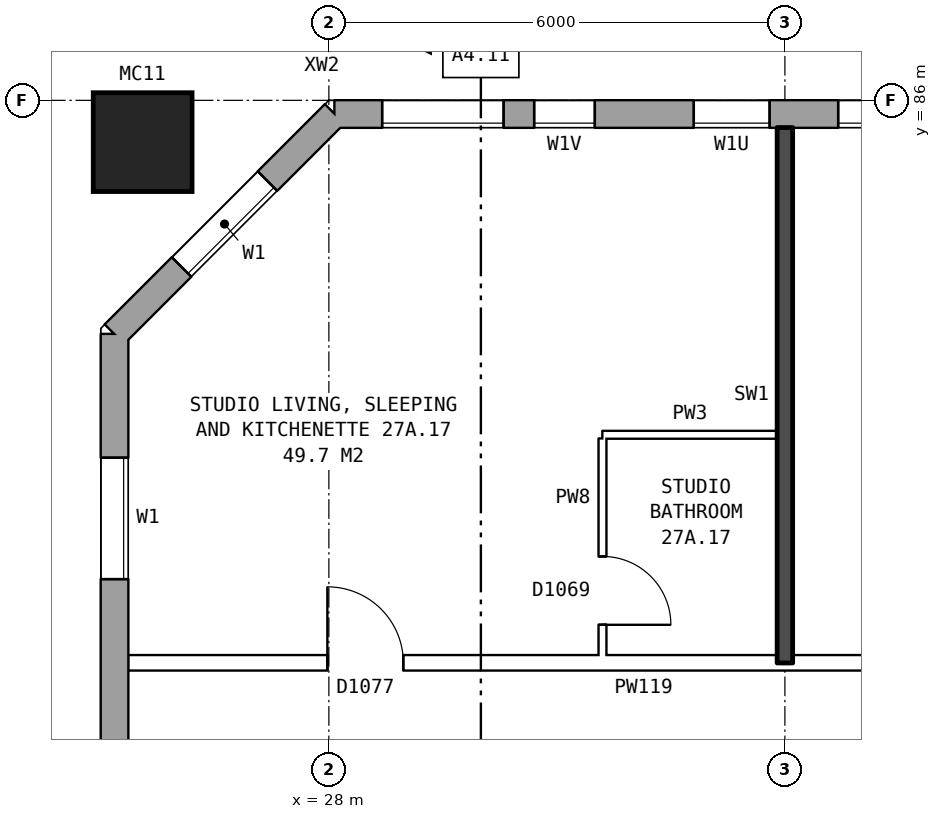
"""IFC4 building model, lengths in metres.
Left out: names, types, materials, properties, quantities, classifications, styles, units other than length and angle.
Written with IfcOpenShell. Run it as: python <this file> out.ifc"""

import sys

from ifc_helpers import new_model, si_unit, direction, frame, frame_2d, origin, origin_2d, place, context, subcontext, project, spatial, rectangle, hollow_rectangle, extrude, element, fill, save


model = new_model("IFC4")
c1 = context("Model", 3, precision=1e-05, world=origin(), true_north=direction((0.0, 1.0)))
c2 = subcontext(c1, "Body", "Model", "MODEL_VIEW")
j1 = project(units=[si_unit("LENGTHUNIT", "METRE"), si_unit("PLANEANGLEUNIT", "RADIAN")], contexts=[c1])
p1 = place(None, origin())
s1 = spatial("IfcSite", under=j1, at=p1, CompositionType="ELEMENT")
p2 = place(p1, origin())
s2 = spatial("IfcBuilding", under=s1, at=p2, CompositionType="ELEMENT")
p3 = place(p2, frame((0.0, 0.0, 99.5)))
s3 = spatial("IfcBuildingStorey", under=s2, at=p3, CompositionType="ELEMENT", Elevation=99.5)
p4 = place(p3, frame((25.55, 85.45, 0.0), z_axis=(0.0, 0.0, 1.0), x_axis=(1.0, 0.0, 0.0)))
e1 = element("IfcColumn", 1, at=p4, inside=s3, PredefinedType="COLUMN", context=c2, shape_type="SweptSolid", body=[
    extrude(hollow_rectangle(XDim=1.3, YDim=1.3, WallThickness=0.07, at=origin_2d()), origin(), (0.0, 0.0, 1.0), 3.1),
])
p5 = place(p3, frame((72.925, 85.82, 0.0), z_axis=(0.0, 0.0, 1.0), x_axis=(-1.0, 0.0, 0.0)))
e2 = element("IfcWall", 2, at=p5, inside=s3, PredefinedType="STANDARD", context=c2, shape_type="SweptSolid", body=[
    extrude(rectangle(XDim=44.851, YDim=0.36, at=frame_2d((22.425, 0.0))), origin(), (0.0, 0.0, 1.0), 2.85),
])
p6 = place(p5, frame((0.625, 0.0, 0.8)))
e3 = element("IfcOpeningElement", 3, at=p6, cuts=e2, PredefinedType="OPENING", context=c2, shape_type="SweptSolid", body=[
    extrude(rectangle(XDim=1.6, YDim=1.8, at=frame_2d((0.8, 0.9))), frame((0.0, 0.19, 0.0), z_axis=(0.0, -1.0, 0.0), x_axis=(1.0, 0.0, 0.0)), (0.0, 0.0, 1.0), 0.38),
])
p7 = place(p5, frame((5.075, 0.0, 0.8)))
e4 = element("IfcOpeningElement", 4, at=p7, cuts=e2, PredefinedType="OPENING", context=c2, shape_type="SweptSolid", body=[
    extrude(rectangle(XDim=1.2, YDim=1.2, at=frame_2d((0.6, 0.6))), frame((0.0, 0.19, 0.0), z_axis=(0.0, -1.0, 0.0), x_axis=(1.0, 0.0, 0.0)), (0.0, 0.0, 1.0), 0.38),
])
p8 = place(p5, frame((6.625, 0.0, 0.8)))
e5 = element("IfcOpeningElement", 5, at=p8, cuts=e2, PredefinedType="OPENING", context=c2, shape_type="SweptSolid", body=[
    extrude(rectangle(XDim=1.6, YDim=1.8, at=frame_2d((0.8, 0.9))), frame((0.0, 0.19, 0.0), z_axis=(0.0, -1.0, 0.0), x_axis=(1.0, 0.0, 0.0)), (0.0, 0.0, 1.0), 0.38),
])
p9 = place(p5, frame((9.625, 0.0, 0.8)))
e6 = element("IfcOpeningElement", 6, at=p9, cuts=e2, PredefinedType="OPENING", context=c2, shape_type="SweptSolid", body=[
    extrude(rectangle(XDim=1.6, YDim=1.8, at=frame_2d((0.8, 0.9))), frame((0.0, 0.19, 0.0), z_axis=(0.0, -1.0, 0.0), x_axis=(1.0, 0.0, 0.0)), (0.0, 0.0, 1.0), 0.38),
])
p10 = place(p5, frame((12.625, 0.0, 0.8)))
e7 = element("IfcOpeningElement", 7, at=p10, cuts=e2, PredefinedType="OPENING", context=c2, shape_type="SweptSolid", body=[
    extrude(rectangle(XDim=1.6, YDim=1.8, at=frame_2d((0.8, 0.9))), frame((0.0, 0.19, 0.0), z_axis=(0.0, -1.0, 0.0), x_axis=(1.0, 0.0, 0.0)), (0.0, 0.0, 1.0), 0.38),
])
p11 = place(p5, frame((15.625, 0.0, 0.8)))
e8 = element("IfcOpeningElement", 8, at=p11, cuts=e2, PredefinedType="OPENING", context=c2, shape_type="SweptSolid", body=[
    extrude(rectangle(XDim=1.6, YDim=1.8, at=frame_2d((0.8, 0.9))), frame((0.0, 0.19, 0.0), z_axis=(0.0, -1.0, 0.0), x_axis=(1.0, 0.0, 0.0)), (0.0, 0.0, 1.0), 0.38),
])
p12 = place(p5, frame((18.625, 0.0, 0.8)))
e9 = element("IfcOpeningElement", 9, at=p12, cuts=e2, PredefinedType="OPENING", context=c2, shape_type="SweptSolid", body=[
    extrude(rectangle(XDim=1.6, YDim=1.8, at=frame_2d((0.8, 0.9))), frame((0.0, 0.19, 0.0), z_axis=(0.0, -1.0, 0.0), x_axis=(1.0, 0.0, 0.0)), (0.0, 0.0, 1.0), 0.38),
])
p13 = place(p5, frame((21.625, 0.0, 0.8)))
e10 = element("IfcOpeningElement", 10, at=p13, cuts=e2, PredefinedType="OPENING", context=c2, shape_type="SweptSolid", body=[
    extrude(rectangle(XDim=1.6, YDim=1.8, at=frame_2d((0.8, 0.9))), frame((0.0, 0.19, 0.0), z_axis=(0.0, -1.0, 0.0), x_axis=(1.0, 0.0, 0.0)), (0.0, 0.0, 1.0), 0.38),
])
p14 = place(p5, frame((24.625, 0.0, 0.8)))
e11 = element("IfcOpeningElement", 11, at=p14, cuts=e2, PredefinedType="OPENING", context=c2, shape_type="SweptSolid", body=[
    extrude(rectangle(XDim=1.6, YDim=1.8, at=frame_2d((0.8, 0.9))), frame((0.0, 0.19, 0.0), z_axis=(0.0, -1.0, 0.0), x_axis=(1.0, 0.0, 0.0)), (0.0, 0.0, 1.0), 0.38),
])
p15 = place(p5, frame((27.625, 0.0, 0.8)))
e12 = element("IfcOpeningElement", 12, at=p15, cuts=e2, PredefinedType="OPENING", context=c2, shape_type="SweptSolid", body=[
    extrude(rectangle(XDim=1.6, YDim=1.8, at=frame_2d((0.8, 0.9))), frame((0.0, 0.19, 0.0), z_axis=(0.0, -1.0, 0.0), x_axis=(1.0, 0.0, 0.0)), (0.0, 0.0, 1.0), 0.38),
])
p16 = place(p5, frame((30.625, 0.0, 0.8)))
e13 = element("IfcOpeningElement", 13, at=p16, cuts=e2, PredefinedType="OPENING", context=c2, shape_type="SweptSolid", body=[
    extrude(rectangle(XDim=1.6, YDim=1.8, at=frame_2d((0.8, 0.9))), frame((0.0, 0.19, 0.0), z_axis=(0.0, -1.0, 0.0), x_axis=(1.0, 0.0, 0.0)), (0.0, 0.0, 1.0), 0.38),
])
p17 = place(p5, frame((33.625, 0.0, 0.8)))
e14 = element("IfcOpeningElement", 14, at=p17, cuts=e2, PredefinedType="OPENING", context=c2, shape_type="SweptSolid", body=[
    extrude(rectangle(XDim=1.6, YDim=1.8, at=frame_2d((0.8, 0.9))), frame((0.0, 0.19, 0.0), z_axis=(0.0, -1.0, 0.0), x_axis=(1.0, 0.0, 0.0)), (0.0, 0.0, 1.0), 0.38),
])
p18 = place(p5, frame((36.625, 0.0, 0.8)))
e15 = element("IfcOpeningElement", 15, at=p18, cuts=e2, PredefinedType="OPENING", context=c2, shape_type="SweptSolid", body=[
    extrude(rectangle(XDim=1.6, YDim=1.8, at=frame_2d((0.8, 0.9))), frame((0.0, 0.19, 0.0), z_axis=(0.0, -1.0, 0.0), x_axis=(1.0, 0.0, 0.0)), (0.0, 0.0, 1.0), 0.38),
])
p19 = place(p5, frame((39.125, 0.0, 0.8)))
e16 = element("IfcOpeningElement", 16, at=p19, cuts=e2, PredefinedType="OPENING", context=c2, shape_type="SweptSolid", body=[
    extrude(rectangle(XDim=1.0, YDim=0.9, at=frame_2d((0.5, 0.45))), frame((0.0, 0.19, 0.0), z_axis=(0.0, -1.0, 0.0), x_axis=(1.0, 0.0, 0.0)), (0.0, 0.0, 1.0), 0.38),
])
p20 = place(p5, frame((42.625, 0.0, 0.8)))
e17 = element("IfcOpeningElement", 17, at=p20, cuts=e2, PredefinedType="OPENING", context=c2, shape_type="SweptSolid", body=[
    extrude(rectangle(XDim=1.6, YDim=1.8, at=frame_2d((0.8, 0.9))), frame((0.0, 0.19, 0.0), z_axis=(0.0, -1.0, 0.0), x_axis=(1.0, 0.0, 0.0)), (0.0, 0.0, 1.0), 0.38),
])
p21 = place(p5, frame((41.425, 0.0, 1.7)))
e18 = element("IfcOpeningElement", 18, at=p21, cuts=e2, PredefinedType="OPENING", context=c2, shape_type="SweptSolid", body=[
    extrude(rectangle(XDim=0.8, YDim=0.9, at=frame_2d((0.4, 0.45))), frame((0.0, 0.19, 0.0), z_axis=(0.0, -1.0, 0.0), x_axis=(1.0, 0.0, 0.0)), (0.0, 0.0, 1.0), 0.38),
])
p22 = place(p3, frame((28.075, 85.82, 0.0), z_axis=(0.0, 0.0, 1.0), x_axis=(-0.707106781187, -0.707106781187, 0.0)))
e19 = element("IfcWall", 19, at=p22, inside=s3, PredefinedType="STANDARD", context=c2, shape_type="SweptSolid", body=[
    extrude(rectangle(XDim=4.094, YDim=0.36, at=frame_2d((2.047, 0.0))), origin(), (0.0, 0.0, 1.0), 2.85),
])
p23 = place(p22, frame((1.247, 0.0, 0.8)))
e20 = element("IfcOpeningElement", 20, at=p23, cuts=e19, PredefinedType="OPENING", context=c2, shape_type="SweptSolid", body=[
    extrude(rectangle(XDim=1.6, YDim=1.8, at=frame_2d((0.8, 0.9))), frame((0.0, 0.19, 0.0), z_axis=(0.0, -1.0, 0.0), x_axis=(1.0, 0.0, 0.0)), (0.0, 0.0, 1.0), 0.38),
])
p24 = place(p3, frame((25.18, 82.925, 0.0), z_axis=(0.0, 0.0, 1.0), x_axis=(0.0, -1.0, 0.0)))
e21 = element("IfcWall", 21, at=p24, inside=s3, PredefinedType="STANDARD", context=c2, shape_type="SweptSolid", body=[
    extrude(rectangle(XDim=25.851, YDim=0.36, at=frame_2d((12.925, 0.0))), origin(), (0.0, 0.0, 1.0), 2.85),
])
p25 = place(p24, frame((1.625, 0.0, 0.8)))
e22 = element("IfcOpeningElement", 22, at=p25, cuts=e21, PredefinedType="OPENING", context=c2, shape_type="SweptSolid", body=[
    extrude(rectangle(XDim=1.6, YDim=1.8, at=frame_2d((0.8, 0.9))), frame((0.0, 0.19, 0.0), z_axis=(0.0, -1.0, 0.0), x_axis=(1.0, 0.0, 0.0)), (0.0, 0.0, 1.0), 0.38),
])
p26 = place(p24, frame((6.175, 0.0, 0.8)))
e23 = element("IfcOpeningElement", 23, at=p26, cuts=e21, PredefinedType="OPENING", context=c2, shape_type="SweptSolid", body=[
    extrude(rectangle(XDim=1.0, YDim=0.9, at=frame_2d((0.5, 0.45))), frame((0.0, 0.19, 0.0), z_axis=(0.0, -1.0, 0.0), x_axis=(1.0, 0.0, 0.0)), (0.0, 0.0, 1.0), 0.38),
])
p27 = place(p24, frame((7.625, 0.0, 0.8)))
e24 = element("IfcOpeningElement", 24, at=p27, cuts=e21, PredefinedType="OPENING", context=c2, shape_type="SweptSolid", body=[
    extrude(rectangle(XDim=1.6, YDim=1.8, at=frame_2d((0.8, 0.9))), frame((0.0, 0.19, 0.0), z_axis=(0.0, -1.0, 0.0), x_axis=(1.0, 0.0, 0.0)), (0.0, 0.0, 1.0), 0.38),
])
p28 = place(p24, frame((10.625, 0.0, 0.8)))
e25 = element("IfcOpeningElement", 25, at=p28, cuts=e21, PredefinedType="OPENING", context=c2, shape_type="SweptSolid", body=[
    extrude(rectangle(XDim=1.6, YDim=1.8, at=frame_2d((0.8, 0.9))), frame((0.0, 0.19, 0.0), z_axis=(0.0, -1.0, 0.0), x_axis=(1.0, 0.0, 0.0)), (0.0, 0.0, 1.0), 0.38),
])
p29 = place(p24, frame((13.625, 0.0, 0.8)))
e26 = element("IfcOpeningElement", 26, at=p29, cuts=e21, PredefinedType="OPENING", context=c2, shape_type="SweptSolid", body=[
    extrude(rectangle(XDim=1.6, YDim=1.8, at=frame_2d((0.8, 0.9))), frame((0.0, 0.19, 0.0), z_axis=(0.0, -1.0, 0.0), x_axis=(1.0, 0.0, 0.0)), (0.0, 0.0, 1.0), 0.38),
])
p30 = place(p24, frame((16.625, 0.0, 0.8)))
e27 = element("IfcOpeningElement", 27, at=p30, cuts=e21, PredefinedType="OPENING", context=c2, shape_type="SweptSolid", body=[
    extrude(rectangle(XDim=1.6, YDim=1.8, at=frame_2d((0.8, 0.9))), frame((0.0, 0.19, 0.0), z_axis=(0.0, -1.0, 0.0), x_axis=(1.0, 0.0, 0.0)), (0.0, 0.0, 1.0), 0.38),
])
p31 = place(p24, frame((9.525, 0.0, 0.8)))
e28 = element("IfcOpeningElement", 28, at=p31, cuts=e21, PredefinedType="OPENING", context=c2, shape_type="SweptSolid", body=[
    extrude(rectangle(XDim=0.8, YDim=1.8, at=frame_2d((0.4, 0.9))), frame((0.0, 0.19, 0.0), z_axis=(0.0, -1.0, 0.0), x_axis=(1.0, 0.0, 0.0)), (0.0, 0.0, 1.0), 0.38),
])
p32 = place(p24, frame((22.625, 0.0, 0.8)))
e29 = element("IfcOpeningElement", 29, at=p32, cuts=e21, PredefinedType="OPENING", context=c2, shape_type="SweptSolid", body=[
    extrude(rectangle(XDim=1.6, YDim=1.8, at=frame_2d((0.8, 0.9))), frame((0.0, 0.19, 0.0), z_axis=(0.0, -1.0, 0.0), x_axis=(1.0, 0.0, 0.0)), (0.0, 0.0, 1.0), 0.38),
])
p33 = place(p24, frame((12.525, 0.0, 0.8)))
e30 = element("IfcOpeningElement", 30, at=p33, cuts=e21, PredefinedType="OPENING", context=c2, shape_type="SweptSolid", body=[
    extrude(rectangle(XDim=0.8, YDim=1.8, at=frame_2d((0.4, 0.9))), frame((0.0, 0.19, 0.0), z_axis=(0.0, -1.0, 0.0), x_axis=(1.0, 0.0, 0.0)), (0.0, 0.0, 1.0), 0.38),
])
p34 = place(p24, frame((15.525, 0.0, 0.8)))
e31 = element("IfcOpeningElement", 31, at=p34, cuts=e21, PredefinedType="OPENING", context=c2, shape_type="SweptSolid", body=[
    extrude(rectangle(XDim=0.8, YDim=1.8, at=frame_2d((0.4, 0.9))), frame((0.0, 0.19, 0.0), z_axis=(0.0, -1.0, 0.0), x_axis=(1.0, 0.0, 0.0)), (0.0, 0.0, 1.0), 0.38),
])
p35 = place(p24, frame((18.525, 0.0, 0.8)))
e32 = element("IfcOpeningElement", 32, at=p35, cuts=e21, PredefinedType="OPENING", context=c2, shape_type="SweptSolid", body=[
    extrude(rectangle(XDim=1.0, YDim=0.9, at=frame_2d((0.5, 0.45))), frame((0.0, 0.19, 0.0), z_axis=(0.0, -1.0, 0.0), x_axis=(1.0, 0.0, 0.0)), (0.0, 0.0, 1.0), 0.38),
])
p36 = place(p3, frame((25.36, 78.6, 0.0), z_axis=(0.0, 0.0, 1.0), x_axis=(1.0, 0.0, 0.0)))
e33 = element("IfcWall", 33, at=p36, inside=s3, PredefinedType="PARTITIONING", context=c2, shape_type="SweptSolid", body=[
    extrude(rectangle(XDim=20.54, YDim=0.2, at=frame_2d((10.27, 0.0))), origin(), (0.0, 0.0, 1.0), 2.85),
])
p37 = place(p36, frame((15.94, 0.0, 0.0)))
e34 = element("IfcOpeningElement", 34, at=p37, cuts=e33, PredefinedType="OPENING", context=c2, shape_type="SweptSolid", body=[
    extrude(rectangle(XDim=1.0, YDim=2.1, at=frame_2d((0.5, 1.05))), frame((0.0, 0.11, 0.0), z_axis=(0.0, -1.0, 0.0), x_axis=(1.0, 0.0, 0.0)), (0.0, 0.0, 1.0), 0.22),
])
p38 = place(p36, frame((9.94, 0.0, 0.0)))
e35 = element("IfcOpeningElement", 35, at=p38, cuts=e33, PredefinedType="OPENING", context=c2, shape_type="SweptSolid", body=[
    extrude(rectangle(XDim=1.0, YDim=2.1, at=frame_2d((0.5, 1.05))), frame((0.0, 0.11, 0.0), z_axis=(0.0, -1.0, 0.0), x_axis=(1.0, 0.0, 0.0)), (0.0, 0.0, 1.0), 0.22),
])
p39 = place(p36, frame((2.62, 0.0, 0.0)))
e36 = element("IfcOpeningElement", 36, at=p39, cuts=e33, PredefinedType="OPENING", context=c2, shape_type="SweptSolid", body=[
    extrude(rectangle(XDim=1.0, YDim=2.1, at=frame_2d((0.5, 1.05))), frame((0.0, 0.11, 0.0), z_axis=(0.0, -1.0, 0.0), x_axis=(1.0, 0.0, 0.0)), (0.0, 0.0, 1.0), 0.22),
])
p40 = place(p3, frame((31.6, 81.6, 0.0), z_axis=(0.0, 0.0, 1.0), x_axis=(1.0, 0.0, 0.0)))
e37 = element("IfcWall", 37, at=p40, inside=s3, PredefinedType="PARTITIONING", context=c2, shape_type="SweptSolid", body=[
    extrude(rectangle(XDim=2.3, YDim=0.1, at=frame_2d((1.15, 0.0))), origin(), (0.0, 0.0, 1.0), 2.85),
])
p41 = place(p3, frame((31.6, 78.7, 0.0), z_axis=(0.0, 0.0, 1.0), x_axis=(0.0, 1.0, 0.0)))
e38 = element("IfcWall", 38, at=p41, inside=s3, PredefinedType="PARTITIONING", context=c2, shape_type="SweptSolid", body=[
    extrude(rectangle(XDim=2.85, YDim=0.1, at=frame_2d((1.425, 0.0))), origin(), (0.0, 0.0, 1.0), 2.85),
])
p42 = place(p41, frame((0.4, 0.0, 0.0)))
e39 = element("IfcOpeningElement", 39, at=p42, cuts=e38, PredefinedType="OPENING", context=c2, shape_type="SweptSolid", body=[
    extrude(rectangle(XDim=0.9, YDim=2.1, at=frame_2d((0.45, 1.05))), frame((0.0, 0.06, 0.0), z_axis=(0.0, -1.0, 0.0), x_axis=(1.0, 0.0, 0.0)), (0.0, 0.0, 1.0), 0.12),
])
p43 = place(p3, frame((34.0, 78.6, 0.0), z_axis=(0.0, 0.0, 1.0), x_axis=(0.0, 1.0, 0.0)))
e40 = element("IfcWall", 40, at=p43, inside=s3, PredefinedType="SOLIDWALL", context=c2, shape_type="SweptSolid", body=[
    extrude(rectangle(XDim=7.04, YDim=0.2, at=frame_2d((3.52, 0.0))), origin(), (0.0, 0.0, 1.0), 2.85),
])
p44 = place(p18, origin())
e41 = element("IfcWindow", 41, at=p44, inside=s3, PartitioningType="SINGLE_PANEL", PredefinedType="WINDOW", context=c2, shape_type="SweptSolid", body=[
    extrude(rectangle(XDim=1.6, YDim=1.8, at=frame_2d((0.8, 0.9))), frame((0.0, 0.15, 0.0), z_axis=(0.0, -1.0, 0.0), x_axis=(1.0, 0.0, 0.0)), (0.0, 0.0, 1.0), 0.06),
])
fill(e15, e41)
p45 = place(p19, origin())
e42 = element("IfcWindow", 42, at=p45, inside=s3, PartitioningType="SINGLE_PANEL", PredefinedType="WINDOW", context=c2, shape_type="SweptSolid", body=[
    extrude(rectangle(XDim=1.0, YDim=0.9, at=frame_2d((0.5, 0.45))), frame((0.0, 0.15, 0.0), z_axis=(0.0, -1.0, 0.0), x_axis=(1.0, 0.0, 0.0)), (0.0, 0.0, 1.0), 0.06),
])
fill(e16, e42)
p46 = place(p20, origin())
e43 = element("IfcWindow", 43, at=p46, inside=s3, PartitioningType="SINGLE_PANEL", PredefinedType="WINDOW", context=c2, shape_type="SweptSolid", body=[
    extrude(rectangle(XDim=1.6, YDim=1.8, at=frame_2d((0.8, 0.9))), frame((0.0, 0.15, 0.0), z_axis=(0.0, -1.0, 0.0), x_axis=(1.0, 0.0, 0.0)), (0.0, 0.0, 1.0), 0.06),
])
fill(e17, e43)
p47 = place(p23, origin())
e44 = element("IfcWindow", 44, at=p47, inside=s3, PartitioningType="SINGLE_PANEL", PredefinedType="WINDOW", context=c2, shape_type="SweptSolid", body=[
    extrude(rectangle(XDim=1.6, YDim=1.8, at=frame_2d((0.8, 0.9))), frame((0.0, 0.15, 0.0), z_axis=(0.0, -1.0, 0.0), x_axis=(1.0, 0.0, 0.0)), (0.0, 0.0, 1.0), 0.06),
])
fill(e20, e44)
p48 = place(p25, origin())
e45 = element("IfcWindow", 45, at=p48, inside=s3, PartitioningType="SINGLE_PANEL", PredefinedType="WINDOW", context=c2, shape_type="SweptSolid", body=[
    extrude(rectangle(XDim=1.6, YDim=1.8, at=frame_2d((0.8, 0.9))), frame((0.0, 0.15, 0.0), z_axis=(0.0, -1.0, 0.0), x_axis=(1.0, 0.0, 0.0)), (0.0, 0.0, 1.0), 0.06),
])
fill(e22, e45)
p49 = place(p39, origin())
e46 = element("IfcDoor", 46, at=p49, inside=s3, OperationType="SINGLE_SWING_LEFT", PredefinedType="DOOR", context=c2, shape_type="SweptSolid", body=[
    extrude(rectangle(XDim=1.0, YDim=2.1, at=frame_2d((0.5, 1.05))), frame((0.0, 0.025, 0.0), z_axis=(0.0, -1.0, 0.0), x_axis=(1.0, 0.0, 0.0)), (0.0, 0.0, 1.0), 0.05),
])
fill(e36, e46)
p50 = place(p42, frame((0.9, 0.0, 0.0), z_axis=(0.0, 0.0, 1.0), x_axis=(-1.0, 0.0, 0.0)))
e47 = element("IfcDoor", 47, at=p50, inside=s3, OperationType="SINGLE_SWING_RIGHT", PredefinedType="DOOR", context=c2, shape_type="SweptSolid", body=[
    extrude(rectangle(XDim=0.9, YDim=2.1, at=frame_2d((0.45, 1.05))), frame((0.0, 0.025, 0.0), z_axis=(0.0, -1.0, 0.0), x_axis=(1.0, 0.0, 0.0)), (0.0, 0.0, 1.0), 0.05),
])
fill(e39, e47)
p51 = place(p21, origin())
e48 = element("IfcWindow", 48, at=p51, inside=s3, PartitioningType="SINGLE_PANEL", PredefinedType="WINDOW", context=c2, shape_type="SweptSolid", body=[
    extrude(rectangle(XDim=0.8, YDim=0.9, at=frame_2d((0.4, 0.45))), frame((0.0, 0.15, 0.0), z_axis=(0.0, -1.0, 0.0), x_axis=(1.0, 0.0, 0.0)), (0.0, 0.0, 1.0), 0.06),
])
fill(e18, e48)
save(model, sys.argv[1])
